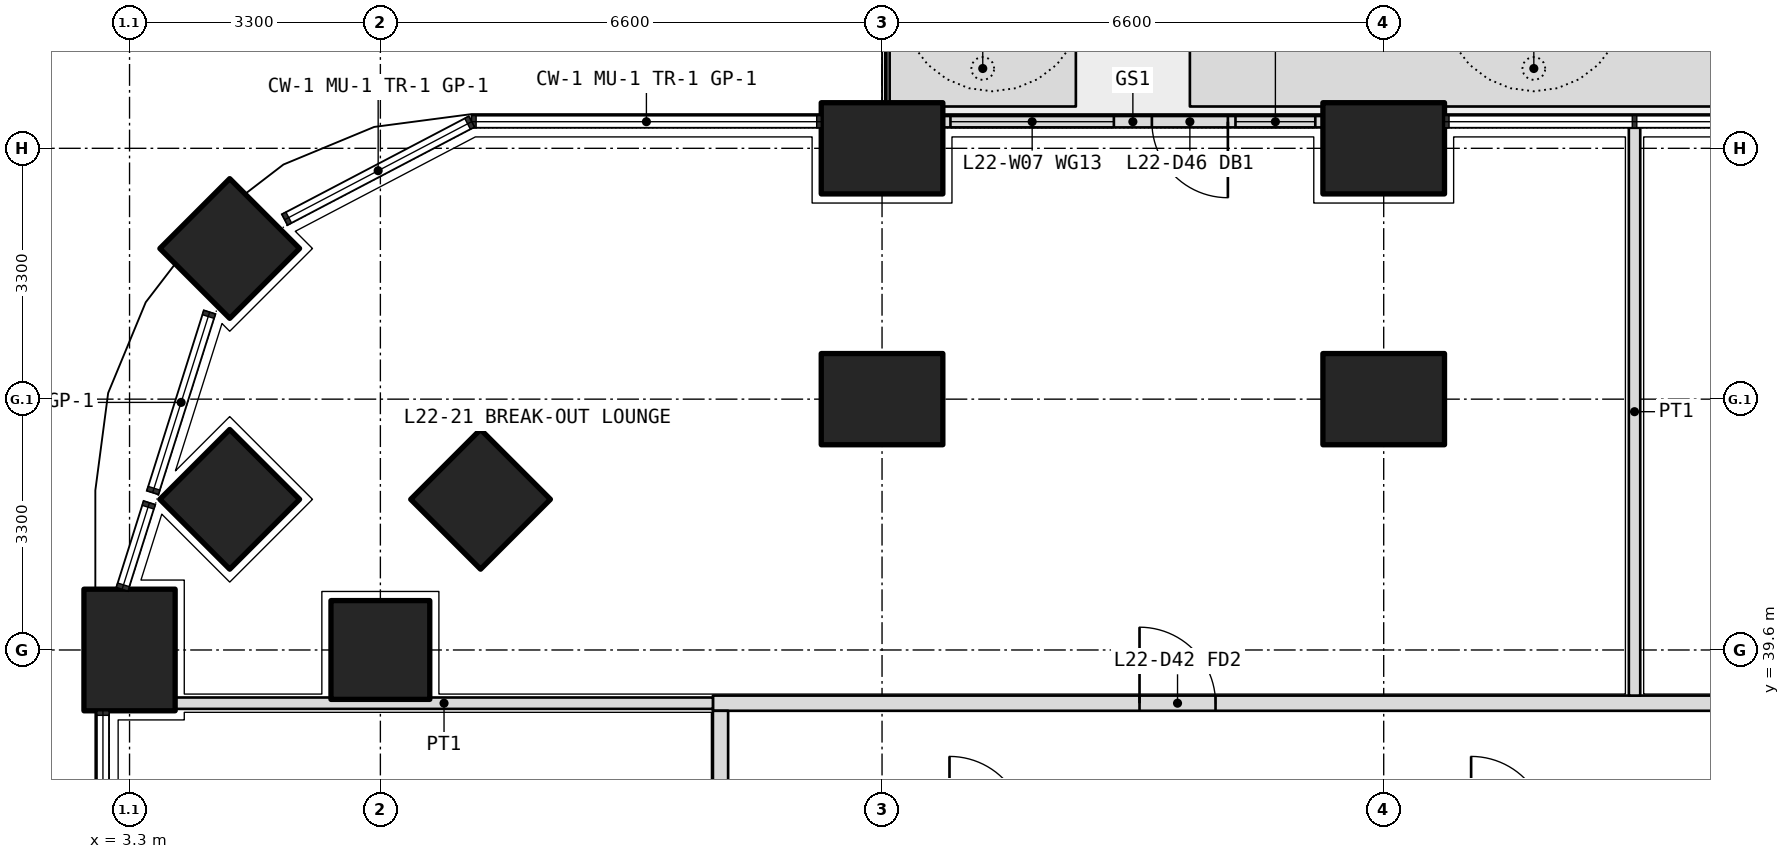
"""IFC4 building model, lengths in metres.
Left out: names, types, materials, properties, quantities, classifications, styles, units other than length and angle.
Written with IfcOpenShell. Run it as: python <this file> out.ifc"""

import sys

from ifc_helpers import new_model, si_unit, direction, frame, frame_2d, origin, origin_2d, place, context, subcontext, project, spatial, polyline, rectangle, outline, extrude, element, fill, save


model = new_model("IFC4")
c1 = context("Model", 3, precision=1e-05, world=origin(), true_north=direction((0.0, 1.0)))
c2 = subcontext(c1, "Body", "Model", "MODEL_VIEW")
j1 = project(units=[si_unit("LENGTHUNIT", "METRE"), si_unit("PLANEANGLEUNIT", "RADIAN")], contexts=[c1])
p1 = place(None, origin())
s1 = spatial("IfcSite", under=j1, at=p1, CompositionType="ELEMENT")
p2 = place(p1, origin())
s2 = spatial("IfcBuilding", under=s1, at=p2, CompositionType="ELEMENT")
p3 = place(p2, frame((0.0, 0.0, 99.0)))
s3 = spatial("IfcBuildingStorey", under=s2, at=p3, CompositionType="ELEMENT", Elevation=99.0)
p4 = place(p3, frame((4.618, 44.882, 0.0), z_axis=(0.0, 0.0, 1.0), x_axis=(0.707106781187, 0.707106781187, 0.0)))
e1 = element("IfcColumn", 1, at=p4, inside=s3, PredefinedType="COLUMN", context=c2, shape_type="SweptSolid", body=[
    extrude(rectangle(XDim=1.3, YDim=1.3, at=origin_2d()), origin(), (0.0, 0.0, 1.0), 4.2),
])
for number, where, z_axis, x_axis in (
    (2, (3.3, 39.6, 0.0), (0.0, 0.0, 1.0), (0.0, 1.0, 0.0)),
    (3, (13.2, 46.2, 0.0), (0.0, 0.0, 1.0), (1.0, 0.0, 0.0)),
    (4, (19.8, 46.2, 0.0), (0.0, 0.0, 1.0), (1.0, 0.0, 0.0)),
):
    element("IfcColumn", number, at=place(p3, frame(where, z_axis=z_axis, x_axis=x_axis)), inside=s3, PredefinedType="COLUMN", context=c2, shape_type="SweptSolid", body=[
        extrude(rectangle(XDim=1.6, YDim=1.2, at=origin_2d()), origin(), (0.0, 0.0, 1.0), 4.2),
    ])
for number, where, z_axis, x_axis in (
    (5, (6.6, 39.6, 0.0), (0.0, 0.0, 1.0), (1.0, 0.0, 0.0)),
    (6, (4.618, 41.582, 0.0), (0.0, 0.0, 1.0), (0.707, 0.707, 0.0)),
):
    element("IfcColumn", number, at=place(p3, frame(where, z_axis=z_axis, x_axis=x_axis)), inside=s3, PredefinedType="COLUMN", context=c2, shape_type="SweptSolid", body=[
        extrude(rectangle(XDim=1.3, YDim=1.3, at=origin_2d()), origin(), (0.0, 0.0, 1.0), 4.2),
    ])
for number, where, z_axis, x_axis in (
    (7, (13.2, 42.9, 0.0), (0.0, 0.0, 1.0), (1.0, 0.0, 0.0)),
    (8, (19.8, 42.9, 0.0), (0.0, 0.0, 1.0), (1.0, 0.0, 0.0)),
):
    element("IfcColumn", number, at=place(p3, frame(where, z_axis=z_axis, x_axis=x_axis)), inside=s3, PredefinedType="COLUMN", context=c2, shape_type="SweptSolid", body=[
        extrude(rectangle(XDim=1.6, YDim=1.2, at=origin_2d()), origin(), (0.0, 0.0, 1.0), 4.2),
    ])
p5 = place(p3, frame((7.918, 41.582, 0.0), z_axis=(0.0, 0.0, 1.0), x_axis=(0.707106781187, 0.707106781187, 0.0)))
e9 = element("IfcColumn", 9, at=p5, inside=s3, PredefinedType="COLUMN", context=c2, shape_type="SweptSolid", body=[
    extrude(rectangle(XDim=1.3, YDim=1.3, at=origin_2d()), origin(), (0.0, 0.0, 1.0), 4.2),
])
p6 = place(p3, origin())
e10 = element("IfcWall", 10, at=p6, inside=s3, PredefinedType="USERDEFINED", context=c2, shape_type="SweptSolid", body=[
    extrude(outline(polyline([(13.3, 46.75), (15.75, 46.75), (15.75, 47.75), (13.3, 47.75), (13.3, 46.75)]), holes=[polyline([(13.45, 46.9), (15.6, 46.9), (15.6, 47.6), (13.45, 47.6), (13.45, 46.9)])]), origin(), (0.0, 0.0, 1.0), 1.05),
])
p7 = place(p3, origin())
e11 = element("IfcWall", 11, at=p7, inside=s3, PredefinedType="USERDEFINED", context=c2, shape_type="SweptSolid", body=[
    extrude(outline(polyline([(17.25, 46.75), (26.3, 46.75), (26.3, 47.75), (17.25, 47.75), (17.25, 46.75)]), holes=[polyline([(17.4, 46.9), (26.15, 46.9), (26.15, 47.6), (17.4, 47.6), (17.4, 46.9)])]), origin(), (0.0, 0.0, 1.0), 1.05),
])
p8 = place(p3, frame((19.0, 46.55, 0.0), z_axis=(0.0, 0.0, 1.0), x_axis=(-1.0, 0.0, 0.0)))
e12 = element("IfcWall", 12, at=p8, inside=s3, PredefinedType="SOLIDWALL", context=c2, shape_type="SweptSolid", body=[
    extrude(rectangle(XDim=5.0, YDim=0.15, at=frame_2d((2.5, 0.0))), origin(), (0.0, 0.0, 1.0), 2.7),
])
p9 = place(p8, frame((1.25, 0.0, 0.0)))
e13 = element("IfcOpeningElement", 13, at=p9, cuts=e12, PredefinedType="OPENING", context=c2, shape_type="SweptSolid", body=[
    extrude(rectangle(XDim=1.0, YDim=2.4, at=frame_2d((0.5, 1.2))), frame((0.0, 0.085, 0.0), z_axis=(0.0, -1.0, 0.0), x_axis=(1.0, 0.0, 0.0)), (0.0, 0.0, 1.0), 0.17),
])
p10 = place(p8, frame((0.1, 0.0, 0.1)))
e14 = element("IfcOpeningElement", 14, at=p10, cuts=e12, PredefinedType="OPENING", context=c2, shape_type="SweptSolid", body=[
    extrude(rectangle(XDim=1.05, YDim=2.3, at=frame_2d((0.525, 1.15))), frame((0.0, 0.085, 0.0), z_axis=(0.0, -1.0, 0.0), x_axis=(1.0, 0.0, 0.0)), (0.0, 0.0, 1.0), 0.17),
])
p11 = place(p8, frame((2.75, 0.0, 0.1)))
e15 = element("IfcOpeningElement", 15, at=p11, cuts=e12, PredefinedType="OPENING", context=c2, shape_type="SweptSolid", body=[
    extrude(rectangle(XDim=2.15, YDim=2.3, at=frame_2d((1.075, 1.15))), frame((0.0, 0.085, 0.0), z_axis=(0.0, -1.0, 0.0), x_axis=(1.0, 0.0, 0.0)), (0.0, 0.0, 1.0), 0.17),
])
p12 = place(p3, frame((10.975, 38.9, 0.0), z_axis=(0.0, 0.0, 1.0), x_axis=(1.0, 0.0, 0.0)))
e16 = element("IfcWall", 16, at=p12, inside=s3, PredefinedType="PARTITIONING", context=c2, shape_type="SweptSolid", body=[
    extrude(rectangle(XDim=30.85, YDim=0.2, at=frame_2d((15.425, 0.0))), origin(), (0.0, 0.0, 1.0), 2.85),
])
p13 = place(p12, frame((5.613, 0.0, 0.0)))
e17 = element("IfcOpeningElement", 17, at=p13, cuts=e16, PredefinedType="OPENING", context=c2, shape_type="SweptSolid", body=[
    extrude(rectangle(XDim=1.0, YDim=2.1, at=frame_2d((0.5, 1.05))), frame((0.0, 0.11, 0.0), z_axis=(0.0, -1.0, 0.0), x_axis=(1.0, 0.0, 0.0)), (0.0, 0.0, 1.0), 0.22),
])
p14 = place(p12, frame((16.575, 0.0, 0.0)))
e18 = element("IfcOpeningElement", 18, at=p14, cuts=e16, PredefinedType="OPENING", context=c2, shape_type="SweptSolid", body=[
    extrude(rectangle(XDim=1.0, YDim=2.1, at=frame_2d((0.5, 1.05))), frame((0.0, 0.11, 0.0), z_axis=(0.0, -1.0, 0.0), x_axis=(1.0, 0.0, 0.0)), (0.0, 0.0, 1.0), 0.22),
])
p15 = place(p12, frame((23.175, 0.0, 0.0)))
e19 = element("IfcOpeningElement", 19, at=p15, cuts=e16, PredefinedType="OPENING", context=c2, shape_type="SweptSolid", body=[
    extrude(rectangle(XDim=1.0, YDim=2.1, at=frame_2d((0.5, 1.05))), frame((0.0, 0.11, 0.0), z_axis=(0.0, -1.0, 0.0), x_axis=(1.0, 0.0, 0.0)), (0.0, 0.0, 1.0), 0.22),
])
p16 = place(p12, frame((27.538, 0.0, 0.0)))
e20 = element("IfcOpeningElement", 20, at=p16, cuts=e16, PredefinedType="OPENING", context=c2, shape_type="SweptSolid", body=[
    extrude(rectangle(XDim=1.0, YDim=2.1, at=frame_2d((0.5, 1.05))), frame((0.0, 0.11, 0.0), z_axis=(0.0, -1.0, 0.0), x_axis=(1.0, 0.0, 0.0)), (0.0, 0.0, 1.0), 0.22),
])
p17 = place(p3, frame((11.075, 11.175, 0.0), z_axis=(0.0, 0.0, 1.0), x_axis=(0.0, 1.0, 0.0)))
e21 = element("IfcWall", 21, at=p17, inside=s3, PredefinedType="PARTITIONING", context=c2, shape_type="SweptSolid", body=[
    extrude(rectangle(XDim=27.625, YDim=0.2, at=frame_2d((13.812, 0.0))), origin(), (0.0, 0.0, 1.0), 2.85),
])
p18 = place(p17, frame((0.462, 0.0, 0.0)))
e22 = element("IfcOpeningElement", 22, at=p18, cuts=e21, PredefinedType="OPENING", context=c2, shape_type="SweptSolid", body=[
    extrude(rectangle(XDim=1.0, YDim=2.1, at=frame_2d((0.5, 1.05))), frame((0.0, 0.11, 0.0), z_axis=(0.0, -1.0, 0.0), x_axis=(1.0, 0.0, 0.0)), (0.0, 0.0, 1.0), 0.22),
])
p19 = place(p17, frame((2.575, 0.0, 0.0)))
e23 = element("IfcOpeningElement", 23, at=p19, cuts=e21, PredefinedType="OPENING", context=c2, shape_type="SweptSolid", body=[
    extrude(rectangle(XDim=1.0, YDim=2.1, at=frame_2d((0.5, 1.05))), frame((0.0, 0.11, 0.0), z_axis=(0.0, -1.0, 0.0), x_axis=(1.0, 0.0, 0.0)), (0.0, 0.0, 1.0), 0.22),
])
p20 = place(p17, frame((5.625, 0.0, 0.0)))
e24 = element("IfcOpeningElement", 24, at=p20, cuts=e21, PredefinedType="OPENING", context=c2, shape_type="SweptSolid", body=[
    extrude(rectangle(XDim=0.9, YDim=2.1, at=frame_2d((0.45, 1.05))), frame((0.0, 0.11, 0.0), z_axis=(0.0, -1.0, 0.0), x_axis=(1.0, 0.0, 0.0)), (0.0, 0.0, 1.0), 0.22),
])
p21 = place(p17, frame((9.425, 0.0, 0.0)))
e25 = element("IfcOpeningElement", 25, at=p21, cuts=e21, PredefinedType="OPENING", context=c2, shape_type="SweptSolid", body=[
    extrude(rectangle(XDim=0.9, YDim=2.1, at=frame_2d((0.45, 1.05))), frame((0.0, 0.11, 0.0), z_axis=(0.0, -1.0, 0.0), x_axis=(1.0, 0.0, 0.0)), (0.0, 0.0, 1.0), 0.22),
])
p22 = place(p17, frame((12.975, 0.0, 0.0)))
e26 = element("IfcOpeningElement", 26, at=p22, cuts=e21, PredefinedType="OPENING", context=c2, shape_type="SweptSolid", body=[
    extrude(rectangle(XDim=1.0, YDim=2.1, at=frame_2d((0.5, 1.05))), frame((0.0, 0.11, 0.0), z_axis=(0.0, -1.0, 0.0), x_axis=(1.0, 0.0, 0.0)), (0.0, 0.0, 1.0), 0.22),
])
p23 = place(p17, frame((20.975, 0.0, 0.0)))
e27 = element("IfcOpeningElement", 27, at=p23, cuts=e21, PredefinedType="OPENING", context=c2, shape_type="SweptSolid", body=[
    extrude(rectangle(XDim=1.0, YDim=2.1, at=frame_2d((0.5, 1.05))), frame((0.0, 0.11, 0.0), z_axis=(0.0, -1.0, 0.0), x_axis=(1.0, 0.0, 0.0)), (0.0, 0.0, 1.0), 0.22),
])
p24 = place(p3, frame((3.9, 38.9, 0.0), z_axis=(0.0, 0.0, 1.0), x_axis=(1.0, 0.0, 0.0)))
e28 = element("IfcWall", 28, at=p24, inside=s3, PredefinedType="PARTITIONING", context=c2, shape_type="SweptSolid", body=[
    extrude(rectangle(XDim=7.075, YDim=0.15, at=frame_2d((3.538, 0.0))), origin(), (0.0, 0.0, 1.0), 2.85),
])
p25 = place(p3, frame((23.1, 46.47, 0.0), z_axis=(0.0, 0.0, 1.0), x_axis=(0.0, -1.0, 0.0)))
e29 = element("IfcWall", 29, at=p25, inside=s3, PredefinedType="PARTITIONING", context=c2, shape_type="SweptSolid", body=[
    extrude(rectangle(XDim=7.47, YDim=0.15, at=frame_2d((3.735, 0.0))), origin(), (0.0, 0.0, 1.0), 2.7),
])
p26 = place(p9, origin())
e30 = element("IfcDoor", 30, at=p26, inside=s3, OperationType="SINGLE_SWING_LEFT", PredefinedType="DOOR", context=c2, shape_type="SweptSolid", body=[
    extrude(rectangle(XDim=1.0, YDim=2.4, at=frame_2d((0.5, 1.2))), frame((0.0, 0.025, 0.0), z_axis=(0.0, -1.0, 0.0), x_axis=(1.0, 0.0, 0.0)), (0.0, 0.0, 1.0), 0.05),
])
fill(e13, e30)
p27 = place(p10, origin())
e31 = element("IfcWindow", 31, at=p27, inside=s3, PartitioningType="SINGLE_PANEL", PredefinedType="WINDOW", context=c2, shape_type="SweptSolid", body=[
    extrude(rectangle(XDim=1.05, YDim=2.3, at=frame_2d((0.525, 1.15))), frame((0.0, 0.03, 0.0), z_axis=(0.0, -1.0, 0.0), x_axis=(1.0, 0.0, 0.0)), (0.0, 0.0, 1.0), 0.06),
])
fill(e14, e31)
p28 = place(p11, origin())
e32 = element("IfcWindow", 32, at=p28, inside=s3, PartitioningType="SINGLE_PANEL", PredefinedType="WINDOW", context=c2, shape_type="SweptSolid", body=[
    extrude(rectangle(XDim=2.15, YDim=2.3, at=frame_2d((1.075, 1.15))), frame((0.0, 0.03, 0.0), z_axis=(0.0, -1.0, 0.0), x_axis=(1.0, 0.0, 0.0)), (0.0, 0.0, 1.0), 0.06),
])
fill(e15, e32)
p29 = place(p13, origin())
e33 = element("IfcDoor", 33, at=p29, inside=s3, OperationType="SINGLE_SWING_LEFT", PredefinedType="DOOR", context=c2, shape_type="SweptSolid", body=[
    extrude(rectangle(XDim=1.0, YDim=2.1, at=frame_2d((0.5, 1.05))), frame((0.0, 0.025, 0.0), z_axis=(0.0, -1.0, 0.0), x_axis=(1.0, 0.0, 0.0)), (0.0, 0.0, 1.0), 0.05),
])
fill(e17, e33)
save(model, sys.argv[1])
